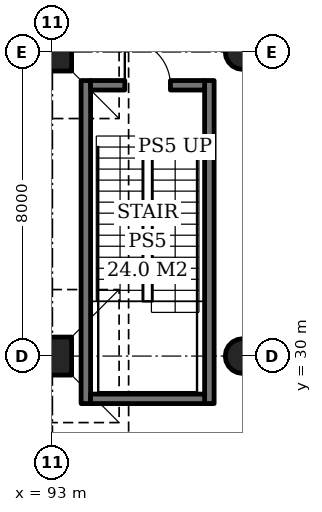
"""IFC4 building model, lengths in metres.
Left out: names, types, materials, properties, quantities, classifications, styles, units other than length and angle.
Written with IfcOpenShell. Run it as: python <this file> out.ifc"""

import sys

from ifc_helpers import new_model, si_unit, direction, frame, frame_2d, origin, origin_2d, place, context, subcontext, project, spatial, rectangle, hollow_circle, extrude, element, fill, save


model = new_model("IFC4")
c1 = context("Model", 3, precision=1e-05, world=origin(), true_north=direction((0.0, 1.0)))
c2 = subcontext(c1, "Body", "Model", "MODEL_VIEW")
j1 = project(units=[si_unit("LENGTHUNIT", "METRE"), si_unit("PLANEANGLEUNIT", "RADIAN")], contexts=[c1])
p1 = place(None, origin())
s1 = spatial("IfcSite", under=j1, at=p1, CompositionType="ELEMENT")
p2 = place(p1, origin())
s2 = spatial("IfcBuilding", under=s1, at=p2, CompositionType="ELEMENT")
p3 = place(p2, frame((0.0, 0.0, -10.0)))
s3 = spatial("IfcBuildingStorey", under=s2, at=p3, CompositionType="ELEMENT", Elevation=-10.0)
for number, where, z_axis, x_axis in (
    (1, (93.0, 30.0, 0.0), (0.0, 0.0, 1.0), (1.0, 0.0, 0.0)),
    (2, (93.0, 38.0, 0.0), (0.0, 0.0, 1.0), (1.0, 0.0, 0.0)),
):
    element("IfcColumn", number, at=place(p3, frame(where, z_axis=z_axis, x_axis=x_axis)), inside=s3, PredefinedType="COLUMN", context=c2, shape_type="SweptSolid", body=[
        extrude(rectangle(XDim=1.0, YDim=1.0, at=origin_2d()), origin(), (0.0, 0.0, 1.0), 5.0),
    ])
for number, where, z_axis, x_axis in (
    (3, (98.0, 30.0, 0.0), (0.0, 0.0, 1.0), (1.0, 0.0, 0.0)),
    (4, (98.0, 38.0, 0.0), (0.0, 0.0, 1.0), (1.0, 0.0, 0.0)),
):
    element("IfcColumn", number, at=place(p3, frame(where, z_axis=z_axis, x_axis=x_axis)), inside=s3, PredefinedType="COLUMN", context=c2, shape_type="SweptSolid", body=[
        extrude(hollow_circle(Radius=0.457, WallThickness=0.03, at=origin_2d()), origin(), (0.0, 0.0, 1.0), 5.0),
    ])
for number, where, z_axis, x_axis in (
    (5, (93.875, 28.75, 0.0), (0.0, 0.0, 1.0), (0.0, 1.0, 0.0)),
    (6, (97.125, 28.75, 0.0), (0.0, 0.0, 1.0), (0.0, 1.0, 0.0)),
):
    element("IfcWall", number, at=place(p3, frame(where, z_axis=z_axis, x_axis=x_axis)), inside=s3, PredefinedType="SOLIDWALL", context=c2, shape_type="SweptSolid", body=[
        extrude(rectangle(XDim=8.5, YDim=0.25, at=frame_2d((4.25, 0.0))), origin(), (0.0, 0.0, 1.0), 4.7),
    ])
p4 = place(p3, frame((94.0, 28.875, 0.0), z_axis=(0.0, 0.0, 1.0), x_axis=(1.0, 0.0, 0.0)))
e7 = element("IfcWall", 7, at=p4, inside=s3, PredefinedType="SOLIDWALL", context=c2, shape_type="SweptSolid", body=[
    extrude(rectangle(XDim=3.0, YDim=0.25, at=frame_2d((1.5, 0.0))), origin(), (0.0, 0.0, 1.0), 4.7),
])
p5 = place(p3, frame((94.0, 37.125, 0.0), z_axis=(0.0, 0.0, 1.0), x_axis=(1.0, 0.0, 0.0)))
e8 = element("IfcWall", 8, at=p5, inside=s3, PredefinedType="SOLIDWALL", context=c2, shape_type="SweptSolid", body=[
    extrude(rectangle(XDim=3.0, YDim=0.25, at=frame_2d((1.5, 0.0))), origin(), (0.0, 0.0, 1.0), 4.7),
])
p6 = place(p5, frame((0.9, 0.0, 0.0)))
e9 = element("IfcOpeningElement", 9, at=p6, cuts=e8, PredefinedType="OPENING", context=c2, shape_type="SweptSolid", body=[
    extrude(rectangle(XDim=1.2, YDim=2.1, at=frame_2d((0.6, 1.05))), frame((0.0, 0.135, 0.0), z_axis=(0.0, -1.0, 0.0), x_axis=(1.0, 0.0, 0.0)), (0.0, 0.0, 1.0), 0.27),
])
p7 = place(p6, origin())
e10 = element("IfcDoor", 10, at=p7, inside=s3, OperationType="SINGLE_SWING_LEFT", PredefinedType="DOOR", context=c2, shape_type="SweptSolid", body=[
    extrude(rectangle(XDim=1.2, YDim=2.1, at=frame_2d((0.6, 1.05))), frame((0.0, 0.025, 0.0), z_axis=(0.0, -1.0, 0.0), x_axis=(1.0, 0.0, 0.0)), (0.0, 0.0, 1.0), 0.05),
])
fill(e9, e10)
save(model, sys.argv[1])
